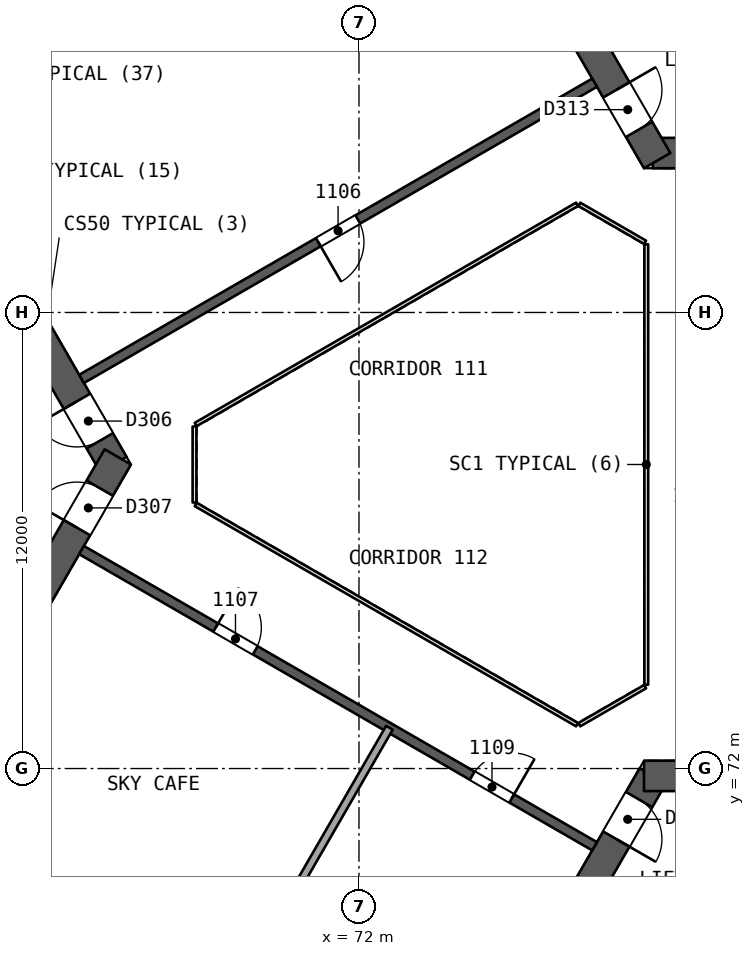
"""IFC4 building model, lengths in metres.
Left out: names, types, materials, properties, quantities, classifications, styles, units other than length and angle.
Written with IfcOpenShell. Run it as: python <this file> out.ifc"""

import sys

from ifc_helpers import new_model, si_unit, direction, frame, frame_2d, origin, place, context, subcontext, project, spatial, rectangle, extrude, element, fill, save


model = new_model("IFC4")
c1 = context("Model", 3, precision=1e-05, world=origin(), true_north=direction((0.0, 1.0)))
c2 = subcontext(c1, "Body", "Model", "MODEL_VIEW")
j1 = project(units=[si_unit("LENGTHUNIT", "METRE"), si_unit("PLANEANGLEUNIT", "RADIAN")], contexts=[c1])
p1 = place(None, origin())
s1 = spatial("IfcSite", under=j1, at=p1, CompositionType="ELEMENT")
p2 = place(p1, origin())
s2 = spatial("IfcBuilding", under=s1, at=p2, CompositionType="ELEMENT")
p3 = place(p2, frame((0.0, 0.0, 52.9)))
s3 = spatial("IfcBuildingStorey", under=s2, at=p3, CompositionType="ELEMENT", Elevation=52.9)
p4 = place(p3, frame((65.538, 80.0, 0.0), z_axis=(0.0, 0.0, 1.0), x_axis=(-0.49999662545, 0.866027352073, 0.0)))
e1 = element("IfcWall", 1, at=p4, inside=s3, PredefinedType="SHEAR", context=c2, shape_type="SweptSolid", body=[
    extrude(rectangle(XDim=10.149, YDim=0.8, at=frame_2d((5.074, 0.0))), origin(), (0.0, 0.0, 1.0), 4.4),
])
p5 = place(p4, frame((0.719, 0.0, 0.0)))
e2 = element("IfcOpeningElement", 2, at=p5, cuts=e1, PredefinedType="OPENING", context=c2, shape_type="SweptSolid", body=[
    extrude(rectangle(XDim=1.2, YDim=2.1, at=frame_2d((0.6, 1.05))), frame((0.0, 0.411, 0.0), z_axis=(0.0, -1.0, 0.0), x_axis=(1.0, 0.0, 0.0)), (0.0, 0.0, 1.0), 0.821),
])
p6 = place(p3, frame((60.664, 71.557, 0.0), z_axis=(0.0, 0.0, 1.0), x_axis=(0.50000409368, 0.866023040284, 0.0)))
e3 = element("IfcWall", 3, at=p6, inside=s3, PredefinedType="SHEAR", context=c2, shape_type="SweptSolid", body=[
    extrude(rectangle(XDim=9.98, YDim=0.8, at=frame_2d((4.99, 0.0))), origin(), (0.0, 0.0, 1.0), 4.4),
])
p7 = place(p6, frame((7.83, 0.0, 0.0)))
e4 = element("IfcOpeningElement", 4, at=p7, cuts=e3, PredefinedType="OPENING", context=c2, shape_type="SweptSolid", body=[
    extrude(rectangle(XDim=1.2, YDim=2.1, at=frame_2d((0.6, 1.05))), frame((0.0, 0.411, 0.0), z_axis=(0.0, -1.0, 0.0), x_axis=(1.0, 0.0, 0.0)), (0.0, 0.0, 1.0), 0.821),
])
p8 = place(p3, frame((79.731, 88.194, 0.0), z_axis=(0.0, 0.0, 1.0), x_axis=(1.0, 0.0, 0.0)))
e5 = element("IfcWall", 5, at=p8, inside=s3, PredefinedType="SHEAR", context=c2, shape_type="SweptSolid", body=[
    extrude(rectangle(XDim=10.149, YDim=0.8, at=frame_2d((5.074, 0.0))), origin(), (0.0, 0.0, 1.0), 4.4),
])
p9 = place(p8, frame((0.719, 0.0, 0.0)))
e6 = element("IfcOpeningElement", 6, at=p9, cuts=e5, PredefinedType="OPENING", context=c2, shape_type="SweptSolid", body=[
    extrude(rectangle(XDim=1.2, YDim=2.1, at=frame_2d((0.6, 1.05))), frame((0.0, 0.411, 0.0), z_axis=(0.0, -1.0, 0.0), x_axis=(1.0, 0.0, 0.0)), (0.0, 0.0, 1.0), 0.821),
])
p10 = place(p3, frame((74.856, 96.637, 0.0), z_axis=(0.0, 0.0, 1.0), x_axis=(0.499993500917, -0.866029155999, 0.0)))
e7 = element("IfcWall", 7, at=p10, inside=s3, PredefinedType="SHEAR", context=c2, shape_type="SweptSolid", body=[
    extrude(rectangle(XDim=9.98, YDim=0.8, at=frame_2d((4.99, 0.0))), origin(), (0.0, 0.0, 1.0), 4.4),
])
p11 = place(p10, frame((7.83, 0.0, 0.0)))
e8 = element("IfcOpeningElement", 8, at=p11, cuts=e7, PredefinedType="OPENING", context=c2, shape_type="SweptSolid", body=[
    extrude(rectangle(XDim=1.2, YDim=2.1, at=frame_2d((0.6, 1.05))), frame((0.0, 0.411, 0.0), z_axis=(0.0, -1.0, 0.0), x_axis=(1.0, 0.0, 0.0)), (0.0, 0.0, 1.0), 0.821),
])
p12 = place(p3, frame((79.731, 71.806, 0.0), z_axis=(0.0, 0.0, 1.0), x_axis=(-0.49999662545, -0.866027352073, 0.0)))
e9 = element("IfcWall", 9, at=p12, inside=s3, PredefinedType="SHEAR", context=c2, shape_type="SweptSolid", body=[
    extrude(rectangle(XDim=10.149, YDim=0.8, at=frame_2d((5.074, 0.0))), origin(), (0.0, 0.0, 1.0), 4.4),
])
p13 = place(p12, frame((0.719, 0.0, 0.0)))
e10 = element("IfcOpeningElement", 10, at=p13, cuts=e9, PredefinedType="OPENING", context=c2, shape_type="SweptSolid", body=[
    extrude(rectangle(XDim=1.2, YDim=2.1, at=frame_2d((0.6, 1.05))), frame((0.0, 0.411, 0.0), z_axis=(0.0, -1.0, 0.0), x_axis=(1.0, 0.0, 0.0)), (0.0, 0.0, 1.0), 0.821),
])
p14 = place(p3, frame((89.48, 71.806, 0.0), z_axis=(0.0, 0.0, 1.0), x_axis=(-1.0, 0.0, 0.0)))
e11 = element("IfcWall", 11, at=p14, inside=s3, PredefinedType="SHEAR", context=c2, shape_type="SweptSolid", body=[
    extrude(rectangle(XDim=9.98, YDim=0.8, at=frame_2d((4.99, 0.0))), origin(), (0.0, 0.0, 1.0), 4.4),
])
p15 = place(p14, frame((7.83, 0.0, 0.0)))
e12 = element("IfcOpeningElement", 12, at=p15, cuts=e11, PredefinedType="OPENING", context=c2, shape_type="SweptSolid", body=[
    extrude(rectangle(XDim=1.2, YDim=2.1, at=frame_2d((0.6, 1.05))), frame((0.0, 0.411, 0.0), z_axis=(0.0, -1.0, 0.0), x_axis=(1.0, 0.0, 0.0)), (0.0, 0.0, 1.0), 0.821),
])
p16 = place(p3, frame((78.2, 90.046, 0.0), z_axis=(0.0, 0.0, 1.0), x_axis=(-0.866026492143, -0.499998114903, 0.0)))
e13 = element("IfcWall", 13, at=p16, inside=s3, PredefinedType="SHEAR", context=c2, shape_type="SweptSolid", body=[
    extrude(rectangle(XDim=15.588, YDim=0.25, at=frame_2d((7.794, 0.0))), origin(), (0.0, 0.0, 1.0), 3.9),
])
p17 = place(p16, frame((7.194, 0.0, 0.0)))
e14 = element("IfcOpeningElement", 14, at=p17, cuts=e13, PredefinedType="OPENING", context=c2, shape_type="SweptSolid", body=[
    extrude(rectangle(XDim=1.2, YDim=2.4, at=frame_2d((0.6, 1.2))), frame((0.0, 0.135, 0.0), z_axis=(0.0, -1.0, 0.0), x_axis=(1.0, 0.0, 0.0)), (0.0, 0.0, 1.0), 0.271),
])
p18 = place(p3, frame((64.7, 77.748, 0.0), z_axis=(0.0, 0.0, 1.0), x_axis=(0.866026492143, -0.499998114903, 0.0)))
e15 = element("IfcWall", 15, at=p18, inside=s3, PredefinedType="SHEAR", context=c2, shape_type="SweptSolid", body=[
    extrude(rectangle(XDim=15.588, YDim=0.25, at=frame_2d((7.794, 0.0))), origin(), (0.0, 0.0, 1.0), 3.9),
])
p19 = place(p18, frame((4.076, 0.0, 0.0)))
e16 = element("IfcOpeningElement", 16, at=p19, cuts=e15, PredefinedType="OPENING", context=c2, shape_type="SweptSolid", body=[
    extrude(rectangle(XDim=1.2, YDim=2.4, at=frame_2d((0.6, 1.2))), frame((0.0, 0.135, 0.0), z_axis=(0.0, -1.0, 0.0), x_axis=(1.0, 0.0, 0.0)), (0.0, 0.0, 1.0), 0.271),
])
p20 = place(p18, frame((11.871, 0.0, 0.0)))
e17 = element("IfcOpeningElement", 17, at=p20, cuts=e15, PredefinedType="OPENING", context=c2, shape_type="SweptSolid", body=[
    extrude(rectangle(XDim=1.2, YDim=2.4, at=frame_2d((0.6, 1.2))), frame((0.0, 0.135, 0.0), z_axis=(0.0, -1.0, 0.0), x_axis=(1.0, 0.0, 0.0)), (0.0, 0.0, 1.0), 0.271),
])
p21 = place(p3, frame((60.333, 70.184, 0.0), z_axis=(0.0, 0.0, 1.0), x_axis=(0.866029102363, -0.49999359382, 0.0)))
e18 = element("IfcWall", 18, at=p21, inside=s3, PredefinedType="PARTITIONING", context=c2, shape_type="SweptSolid", body=[
    extrude(rectangle(XDim=9.353, YDim=0.15, at=frame_2d((4.677, 0.0))), origin(), (0.0, 0.0, 1.0), 3.9),
])
p22 = place(p21, frame((4.227, 0.0, 0.0)))
e19 = element("IfcOpeningElement", 19, at=p22, cuts=e18, PredefinedType="OPENING", context=c2, shape_type="SweptSolid", body=[
    extrude(rectangle(XDim=0.9, YDim=2.1, at=frame_2d((0.45, 1.05))), frame((0.0, 0.085, 0.0), z_axis=(0.0, -1.0, 0.0), x_axis=(1.0, 0.0, 0.0)), (0.0, 0.0, 1.0), 0.171),
])
p23 = place(p3, frame((68.423, 65.49, 0.0), z_axis=(0.0, 0.0, 1.0), x_axis=(0.499999262521, 0.866025829568, 0.0)))
e20 = element("IfcWall", 20, at=p23, inside=s3, PredefinedType="PARTITIONING", context=c2, shape_type="SweptSolid", body=[
    extrude(rectangle(XDim=8.754, YDim=0.2, at=frame_2d((4.377, 0.0))), origin(), (0.0, 0.0, 1.0), 3.9),
])
p24 = place(p3, frame((86.77, 89.486, 0.0), z_axis=(0.0, 0.0, 1.0), x_axis=(-0.86601811187, 0.500012629753, 0.0)))
e21 = element("IfcWall", 21, at=p24, inside=s3, PredefinedType="SOLIDWALL", context=c2, shape_type="SweptSolid", body=[
    extrude(rectangle(XDim=10.9, YDim=0.2, at=frame_2d((5.45, 0.0))), origin(), (0.0, 0.0, 1.0), 3.9),
])
p25 = place(p3, frame((77.135, 64.952, 0.0), z_axis=(0.0, 0.0, 1.0), x_axis=(0.866031916153, 0.499988720078, 0.0)))
e22 = element("IfcWall", 22, at=p25, inside=s3, PredefinedType="SOLIDWALL", context=c2, shape_type="SweptSolid", body=[
    extrude(rectangle(XDim=11.35, YDim=0.2, at=frame_2d((5.675, 0.0))), origin(), (0.0, 0.0, 1.0), 3.9),
])
p26 = place(p3, frame((79.56, 74.206, 0.0), z_axis=(0.0, 0.0, 1.0), x_axis=(0.0, 1.0, 0.0)))
e23 = element("IfcWall", 23, at=p26, inside=s3, PredefinedType="PARTITIONING", context=c2, shape_type="SweptSolid", body=[
    extrude(rectangle(XDim=11.588, YDim=0.1, at=frame_2d((5.794, 0.0))), origin(), (0.0, 0.0, 1.0), 3.9),
])
p27 = place(p3, frame((79.53, 85.846, 0.0), z_axis=(0.0, 0.0, 1.0), x_axis=(-0.866041268327, 0.499972520799, 0.0)))
e24 = element("IfcWall", 24, at=p27, inside=s3, PredefinedType="PARTITIONING", context=c2, shape_type="SweptSolid", body=[
    extrude(rectangle(XDim=2.0, YDim=0.1, at=frame_2d((1.0, 0.0))), origin(), (0.0, 0.0, 1.0), 3.9),
])
p28 = place(p3, frame((77.738, 86.846, 0.0), z_axis=(0.0, 0.0, 1.0), x_axis=(-0.866026658274, -0.499997827154, 0.0)))
e25 = element("IfcWall", 25, at=p28, inside=s3, PredefinedType="PARTITIONING", context=c2, shape_type="SweptSolid", body=[
    extrude(rectangle(XDim=11.588, YDim=0.1, at=frame_2d((5.794, 0.0))), origin(), (0.0, 0.0, 1.0), 3.9),
])
p29 = place(p3, frame((67.672, 81.0, 0.0), z_axis=(0.0, 0.0, 1.0), x_axis=(0.0, -1.0, 0.0)))
e26 = element("IfcWall", 26, at=p29, inside=s3, PredefinedType="PARTITIONING", context=c2, shape_type="SweptSolid", body=[
    extrude(rectangle(XDim=2.0, YDim=0.1, at=frame_2d((1.0, 0.0))), origin(), (0.0, 0.0, 1.0), 3.9),
])
p30 = place(p3, frame((67.702, 78.948, 0.0), z_axis=(0.0, 0.0, 1.0), x_axis=(0.866026658274, -0.499997827154, 0.0)))
e27 = element("IfcWall", 27, at=p30, inside=s3, PredefinedType="PARTITIONING", context=c2, shape_type="SweptSolid", body=[
    extrude(rectangle(XDim=11.588, YDim=0.1, at=frame_2d((5.794, 0.0))), origin(), (0.0, 0.0, 1.0), 3.9),
])
p31 = place(p3, frame((77.798, 73.154, 0.0), z_axis=(0.0, 0.0, 1.0), x_axis=(0.866041268327, 0.499972520799, 0.0)))
e28 = element("IfcWall", 28, at=p31, inside=s3, PredefinedType="PARTITIONING", context=c2, shape_type="SweptSolid", body=[
    extrude(rectangle(XDim=2.0, YDim=0.1, at=frame_2d((1.0, 0.0))), origin(), (0.0, 0.0, 1.0), 3.9),
])
p32 = place(p17, origin())
e29 = element("IfcDoor", 29, at=p32, inside=s3, OperationType="SINGLE_SWING_RIGHT", PredefinedType="NOTDEFINED", context=c2, shape_type="SweptSolid", body=[
    extrude(rectangle(XDim=1.2, YDim=2.4, at=frame_2d((0.6, 1.2))), frame((0.0, 0.025, 0.0), z_axis=(0.0, -1.0, 0.0), x_axis=(1.0, 0.0, 0.0)), (0.0, 0.0, 1.0), 0.05),
])
fill(e14, e29)
p33 = place(p19, origin())
e30 = element("IfcDoor", 30, at=p33, inside=s3, OperationType="SINGLE_SWING_LEFT", PredefinedType="NOTDEFINED", context=c2, shape_type="SweptSolid", body=[
    extrude(rectangle(XDim=1.2, YDim=2.4, at=frame_2d((0.6, 1.2))), frame((0.0, 0.025, 0.0), z_axis=(0.0, -1.0, 0.0), x_axis=(1.0, 0.0, 0.0)), (0.0, 0.0, 1.0), 0.05),
])
fill(e16, e30)
p34 = place(p20, origin())
e31 = element("IfcDoor", 31, at=p34, inside=s3, OperationType="SINGLE_SWING_RIGHT", PredefinedType="NOTDEFINED", context=c2, shape_type="SweptSolid", body=[
    extrude(rectangle(XDim=1.2, YDim=2.4, at=frame_2d((0.6, 1.2))), frame((0.0, 0.025, 0.0), z_axis=(0.0, -1.0, 0.0), x_axis=(1.0, 0.0, 0.0)), (0.0, 0.0, 1.0), 0.05),
])
fill(e17, e31)
p35 = place(p5, origin())
e32 = element("IfcDoor", 32, at=p35, inside=s3, OperationType="SINGLE_SWING_RIGHT", PredefinedType="NOTDEFINED", context=c2, shape_type="SweptSolid", body=[
    extrude(rectangle(XDim=1.2, YDim=2.1, at=frame_2d((0.6, 1.05))), frame((0.0, 0.025, 0.0), z_axis=(0.0, -1.0, 0.0), x_axis=(1.0, 0.0, 0.0)), (0.0, 0.0, 1.0), 0.05),
])
fill(e2, e32)
p36 = place(p7, origin())
e33 = element("IfcDoor", 33, at=p36, inside=s3, OperationType="SINGLE_SWING_LEFT", PredefinedType="NOTDEFINED", context=c2, shape_type="SweptSolid", body=[
    extrude(rectangle(XDim=1.2, YDim=2.1, at=frame_2d((0.6, 1.05))), frame((0.0, 0.025, 0.0), z_axis=(0.0, -1.0, 0.0), x_axis=(1.0, 0.0, 0.0)), (0.0, 0.0, 1.0), 0.05),
])
fill(e4, e33)
p37 = place(p11, origin())
e34 = element("IfcDoor", 34, at=p37, inside=s3, OperationType="SINGLE_SWING_LEFT", PredefinedType="NOTDEFINED", context=c2, shape_type="SweptSolid", body=[
    extrude(rectangle(XDim=1.2, YDim=2.1, at=frame_2d((0.6, 1.05))), frame((0.0, 0.025, 0.0), z_axis=(0.0, -1.0, 0.0), x_axis=(1.0, 0.0, 0.0)), (0.0, 0.0, 1.0), 0.05),
])
fill(e8, e34)
p38 = place(p13, origin())
e35 = element("IfcDoor", 35, at=p38, inside=s3, OperationType="SINGLE_SWING_RIGHT", PredefinedType="NOTDEFINED", context=c2, shape_type="SweptSolid", body=[
    extrude(rectangle(XDim=1.2, YDim=2.1, at=frame_2d((0.6, 1.05))), frame((0.0, 0.025, 0.0), z_axis=(0.0, -1.0, 0.0), x_axis=(1.0, 0.0, 0.0)), (0.0, 0.0, 1.0), 0.05),
])
fill(e10, e35)
save(model, sys.argv[1])
